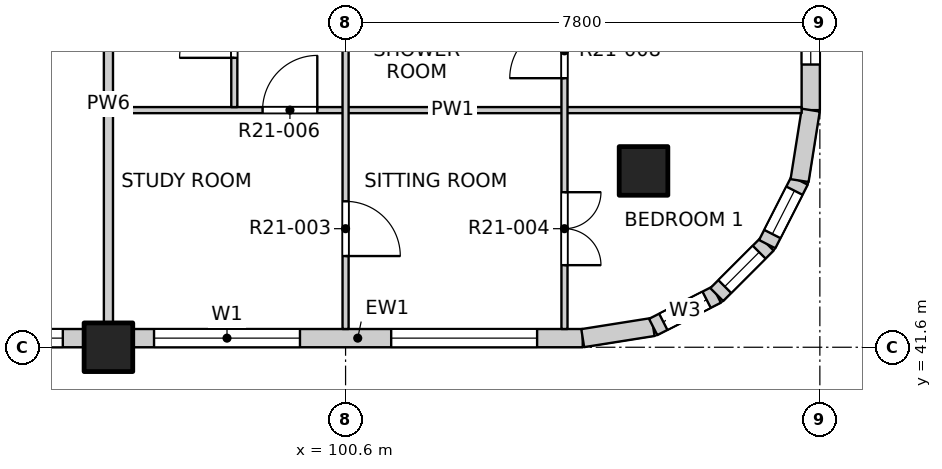
"""IFC4 building model, lengths in metres.
Left out: names, types, materials, properties, quantities, classifications, styles, units other than length and angle.
Written with IfcOpenShell. Run it as: python <this file> out.ifc"""

import sys

from ifc_helpers import new_model, si_unit, direction, frame, frame_2d, origin, origin_2d, place, context, subcontext, project, spatial, rectangle, extrude, element, fill, save


model = new_model("IFC4")
c1 = context("Model", 3, precision=1e-05, world=origin(), true_north=direction((0.0, 1.0)))
c2 = subcontext(c1, "Body", "Model", "MODEL_VIEW")
j1 = project(units=[si_unit("LENGTHUNIT", "METRE"), si_unit("PLANEANGLEUNIT", "RADIAN")], contexts=[c1])
p1 = place(None, origin())
s1 = spatial("IfcSite", under=j1, at=p1, CompositionType="ELEMENT")
p2 = place(p1, origin())
s2 = spatial("IfcBuilding", under=s1, at=p2, CompositionType="ELEMENT")
p3 = place(p2, frame((0.0, 0.0, 214.3)))
s3 = spatial("IfcBuildingStorey", under=s2, at=p3, CompositionType="ELEMENT", Elevation=214.3)
for number, where, z_axis, x_axis in (
    (1, (105.5, 44.5, -0.25), (0.0, 0.0, 1.0), (1.0, 0.0, 0.0)),
    (2, (96.7, 41.6, -0.25), (0.0, 0.0, 1.0), (1.0, 0.0, 0.0)),
):
    element("IfcColumn", number, at=place(p3, frame(where, z_axis=z_axis, x_axis=x_axis)), inside=s3, PredefinedType="COLUMN", context=c2, shape_type="SweptSolid", body=[
        extrude(rectangle(XDim=0.8, YDim=0.8, at=origin_2d()), origin(), (0.0, 0.0, 1.0), 3.4),
    ])
p4 = place(p3, frame((89.3, 41.75, 0.0), z_axis=(0.0, 0.0, 1.0), x_axis=(1.0, 0.0, 0.0)))
e3 = element("IfcWall", 3, at=p4, inside=s3, PredefinedType="SOLIDWALL", context=c2, shape_type="SweptSolid", body=[
    extrude(rectangle(XDim=7.0, YDim=0.3, at=frame_2d((3.5, 0.0))), origin(), (0.0, 0.0, 1.0), 2.7),
])
p5 = place(p4, frame((0.35, 0.0, 0.9)))
e4 = element("IfcOpeningElement", 4, at=p5, cuts=e3, PredefinedType="OPENING", context=c2, shape_type="SweptSolid", body=[
    extrude(rectangle(XDim=2.4, YDim=1.8, at=frame_2d((1.2, 0.9))), frame((0.0, 0.16, 0.0), z_axis=(0.0, -1.0, 0.0), x_axis=(1.0, 0.0, 0.0)), (0.0, 0.0, 1.0), 0.32),
])
p6 = place(p4, frame((4.25, 0.0, 0.9)))
e5 = element("IfcOpeningElement", 5, at=p6, cuts=e3, PredefinedType="OPENING", context=c2, shape_type="SweptSolid", body=[
    extrude(rectangle(XDim=2.4, YDim=1.8, at=frame_2d((1.2, 0.9))), frame((0.0, 0.16, 0.0), z_axis=(0.0, -1.0, 0.0), x_axis=(1.0, 0.0, 0.0)), (0.0, 0.0, 1.0), 0.32),
])
p7 = place(p3, frame((97.1, 41.75, 0.0), z_axis=(0.0, 0.0, 1.0), x_axis=(1.0, 0.0, 0.0)))
e6 = element("IfcWall", 6, at=p7, inside=s3, PredefinedType="SOLIDWALL", context=c2, shape_type="SweptSolid", body=[
    extrude(rectangle(XDim=7.4, YDim=0.3, at=frame_2d((3.7, 0.0))), origin(), (0.0, 0.0, 1.0), 2.7),
])
p8 = place(p7, frame((0.35, 0.0, 0.9)))
e7 = element("IfcOpeningElement", 7, at=p8, cuts=e6, PredefinedType="OPENING", context=c2, shape_type="SweptSolid", body=[
    extrude(rectangle(XDim=2.4, YDim=1.8, at=frame_2d((1.2, 0.9))), frame((0.0, 0.16, 0.0), z_axis=(0.0, -1.0, 0.0), x_axis=(1.0, 0.0, 0.0)), (0.0, 0.0, 1.0), 0.32),
])
p9 = place(p7, frame((4.25, 0.0, 0.9)))
e8 = element("IfcOpeningElement", 8, at=p9, cuts=e6, PredefinedType="OPENING", context=c2, shape_type="SweptSolid", body=[
    extrude(rectangle(XDim=2.4, YDim=1.8, at=frame_2d((1.2, 0.9))), frame((0.0, 0.16, 0.0), z_axis=(0.0, -1.0, 0.0), x_axis=(1.0, 0.0, 0.0)), (0.0, 0.0, 1.0), 0.32),
])
p10 = place(p3, frame((108.25, 45.5, 0.0), z_axis=(0.0, 0.0, 1.0), x_axis=(0.0, 1.0, 0.0)))
e9 = element("IfcWall", 9, at=p10, inside=s3, PredefinedType="SOLIDWALL", context=c2, shape_type="SweptSolid", body=[
    extrude(rectangle(XDim=7.4, YDim=0.3, at=frame_2d((3.7, 0.0))), origin(), (0.0, 0.0, 1.0), 2.7),
])
p11 = place(p10, frame((0.75, 0.0, 0.9)))
e10 = element("IfcOpeningElement", 10, at=p11, cuts=e9, PredefinedType="OPENING", context=c2, shape_type="SweptSolid", body=[
    extrude(rectangle(XDim=2.4, YDim=1.8, at=frame_2d((1.2, 0.9))), frame((0.0, 0.16, 0.0), z_axis=(0.0, -1.0, 0.0), x_axis=(1.0, 0.0, 0.0)), (0.0, 0.0, 1.0), 0.32),
])
p12 = place(p10, frame((4.65, 0.0, 0.9)))
e11 = element("IfcOpeningElement", 11, at=p12, cuts=e9, PredefinedType="OPENING", context=c2, shape_type="SweptSolid", body=[
    extrude(rectangle(XDim=2.4, YDim=1.8, at=frame_2d((1.2, 0.9))), frame((0.0, 0.16, 0.0), z_axis=(0.0, -1.0, 0.0), x_axis=(1.0, 0.0, 0.0)), (0.0, 0.0, 1.0), 0.32),
])
p13 = place(p3, frame((104.5, 41.75, 0.0), z_axis=(0.0, 0.0, 1.0), x_axis=(0.987678452879, 0.156496880861, 0.0)))
e12 = element("IfcWall", 12, at=p13, inside=s3, PredefinedType="SOLIDWALL", context=c2, shape_type="SweptSolid", body=[
    extrude(rectangle(XDim=1.173, YDim=0.3, at=frame_2d((0.586, 0.0))), origin(), (0.0, 0.0, 1.0), 2.7),
])
p14 = place(p3, frame((105.659, 41.934, 0.0), z_axis=(0.0, 0.0, 1.0), x_axis=(0.890988677504, 0.454025524128, 0.0)))
e13 = element("IfcWall", 13, at=p14, inside=s3, PredefinedType="SOLIDWALL", context=c2, shape_type="SweptSolid", body=[
    extrude(rectangle(XDim=1.173, YDim=0.3, at=frame_2d((0.587, 0.0))), origin(), (0.0, 0.0, 1.0), 2.7),
])
p15 = place(p14, frame((0.187, 0.0, 0.9)))
e14 = element("IfcOpeningElement", 14, at=p15, cuts=e13, PredefinedType="OPENING", context=c2, shape_type="SweptSolid", body=[
    extrude(rectangle(XDim=0.8, YDim=1.2, at=frame_2d((0.4, 0.6))), frame((0.0, 0.16, 0.0), z_axis=(0.0, -1.0, 0.0), x_axis=(1.0, 0.0, 0.0)), (0.0, 0.0, 1.0), 0.32),
])
p16 = place(p3, frame((106.704, 42.466, 0.0), z_axis=(0.0, 0.0, 1.0), x_axis=(0.707106781187, 0.707106781187, 0.0)))
e15 = element("IfcWall", 15, at=p16, inside=s3, PredefinedType="SOLIDWALL", context=c2, shape_type="SweptSolid", body=[
    extrude(rectangle(XDim=1.173, YDim=0.3, at=frame_2d((0.586, 0.0))), origin(), (0.0, 0.0, 1.0), 2.7),
])
p17 = place(p16, frame((0.187, 0.0, 0.9)))
e16 = element("IfcOpeningElement", 16, at=p17, cuts=e15, PredefinedType="OPENING", context=c2, shape_type="SweptSolid", body=[
    extrude(rectangle(XDim=0.8, YDim=1.2, at=frame_2d((0.4, 0.6))), frame((0.0, 0.16, 0.0), z_axis=(0.0, -1.0, 0.0), x_axis=(1.0, 0.0, 0.0)), (0.0, 0.0, 1.0), 0.32),
])
p18 = place(p3, frame((107.534, 43.296, 0.0), z_axis=(0.0, 0.0, 1.0), x_axis=(0.454025524128, 0.890988677504, 0.0)))
e17 = element("IfcWall", 17, at=p18, inside=s3, PredefinedType="SOLIDWALL", context=c2, shape_type="SweptSolid", body=[
    extrude(rectangle(XDim=1.173, YDim=0.3, at=frame_2d((0.587, 0.0))), origin(), (0.0, 0.0, 1.0), 2.7),
])
p19 = place(p18, frame((0.187, 0.0, 0.9)))
e18 = element("IfcOpeningElement", 18, at=p19, cuts=e17, PredefinedType="OPENING", context=c2, shape_type="SweptSolid", body=[
    extrude(rectangle(XDim=0.8, YDim=1.2, at=frame_2d((0.4, 0.6))), frame((0.0, 0.16, 0.0), z_axis=(0.0, -1.0, 0.0), x_axis=(1.0, 0.0, 0.0)), (0.0, 0.0, 1.0), 0.32),
])
p20 = place(p3, frame((108.066, 44.341, 0.0), z_axis=(0.0, 0.0, 1.0), x_axis=(0.156496880861, 0.987678452879, 0.0)))
e19 = element("IfcWall", 19, at=p20, inside=s3, PredefinedType="SOLIDWALL", context=c2, shape_type="SweptSolid", body=[
    extrude(rectangle(XDim=1.173, YDim=0.3, at=frame_2d((0.586, 0.0))), origin(), (0.0, 0.0, 1.0), 2.7),
])
p21 = place(p3, frame((96.625, 45.5, 0.0), z_axis=(0.0, 0.0, 1.0), x_axis=(1.0, 0.0, 0.0)))
e20 = element("IfcWall", 20, at=p21, inside=s3, PredefinedType="PARTITIONING", context=c2, shape_type="SweptSolid", body=[
    extrude(rectangle(XDim=11.475, YDim=0.1, at=frame_2d((5.738, 0.0))), origin(), (0.0, 0.0, 1.0), 3.15),
])
p22 = place(p21, frame((2.61, 0.0, 0.0)))
e21 = element("IfcOpeningElement", 21, at=p22, cuts=e20, PredefinedType="OPENING", context=c2, shape_type="SweptSolid", body=[
    extrude(rectangle(XDim=0.9, YDim=2.1, at=frame_2d((0.45, 1.05))), frame((0.0, 0.06, 0.0), z_axis=(0.0, -1.0, 0.0), x_axis=(1.0, 0.0, 0.0)), (0.0, 0.0, 1.0), 0.12),
])
p23 = place(p3, frame((96.7, 41.9, 0.0), z_axis=(0.0, 0.0, 1.0), x_axis=(0.0, 1.0, 0.0)))
e22 = element("IfcWall", 22, at=p23, inside=s3, PredefinedType="PARTITIONING", context=c2, shape_type="SweptSolid", body=[
    extrude(rectangle(XDim=7.4, YDim=0.15, at=frame_2d((3.7, 0.0))), origin(), (0.0, 0.0, 1.0), 3.15),
])
p24 = place(p3, frame((98.77, 45.55, 0.0), z_axis=(0.0, 0.0, 1.0), x_axis=(0.0, 1.0, 0.0)))
e23 = element("IfcWall", 23, at=p24, inside=s3, PredefinedType="PARTITIONING", context=c2, shape_type="SweptSolid", body=[
    extrude(rectangle(XDim=8.35, YDim=0.1, at=frame_2d((4.175, 0.0))), origin(), (0.0, 0.0, 1.0), 3.15),
])
p25 = place(p24, frame((0.81, 0.0, 0.0)))
e24 = element("IfcOpeningElement", 24, at=p25, cuts=e23, PredefinedType="OPENING", context=c2, shape_type="SweptSolid", body=[
    extrude(rectangle(XDim=0.9, YDim=2.1, at=frame_2d((0.45, 1.05))), frame((0.0, 0.06, 0.0), z_axis=(0.0, -1.0, 0.0), x_axis=(1.0, 0.0, 0.0)), (0.0, 0.0, 1.0), 0.12),
])
p26 = place(p24, frame((3.21, 0.0, 0.0)))
e25 = element("IfcOpeningElement", 25, at=p26, cuts=e23, PredefinedType="OPENING", context=c2, shape_type="SweptSolid", body=[
    extrude(rectangle(XDim=0.8, YDim=2.1, at=frame_2d((0.4, 1.05))), frame((0.0, 0.06, 0.0), z_axis=(0.0, -1.0, 0.0), x_axis=(1.0, 0.0, 0.0)), (0.0, 0.0, 1.0), 0.12),
])
p27 = place(p24, frame((5.1, 0.0, 0.0)))
e26 = element("IfcOpeningElement", 26, at=p27, cuts=e23, PredefinedType="OPENING", context=c2, shape_type="SweptSolid", body=[
    extrude(rectangle(XDim=0.9, YDim=2.1, at=frame_2d((0.45, 1.05))), frame((0.0, 0.06, 0.0), z_axis=(0.0, -1.0, 0.0), x_axis=(1.0, 0.0, 0.0)), (0.0, 0.0, 1.0), 0.12),
])
p28 = place(p24, frame((6.975, 0.0, 0.0)))
e27 = element("IfcOpeningElement", 27, at=p28, cuts=e23, PredefinedType="OPENING", context=c2, shape_type="SweptSolid", body=[
    extrude(rectangle(XDim=0.9, YDim=2.1, at=frame_2d((0.45, 1.05))), frame((0.0, 0.06, 0.0), z_axis=(0.0, -1.0, 0.0), x_axis=(1.0, 0.0, 0.0)), (0.0, 0.0, 1.0), 0.12),
])
p29 = place(p3, frame((100.6, 41.9, 0.0), z_axis=(0.0, 0.0, 1.0), x_axis=(0.0, 1.0, 0.0)))
e28 = element("IfcWall", 28, at=p29, inside=s3, PredefinedType="PARTITIONING", context=c2, shape_type="SweptSolid", body=[
    extrude(rectangle(XDim=46.2, YDim=0.1, at=frame_2d((23.1, 0.0))), origin(), (0.0, 0.0, 1.0), 3.15),
])
p30 = place(p29, frame((1.2, 0.0, 0.0)))
e29 = element("IfcOpeningElement", 29, at=p30, cuts=e28, PredefinedType="OPENING", context=c2, shape_type="SweptSolid", body=[
    extrude(rectangle(XDim=0.9, YDim=2.1, at=frame_2d((0.45, 1.05))), frame((0.0, 0.06, 0.0), z_axis=(0.0, -1.0, 0.0), x_axis=(1.0, 0.0, 0.0)), (0.0, 0.0, 1.0), 0.12),
])
p31 = place(p29, frame((6.025, 0.0, 0.0)))
e30 = element("IfcOpeningElement", 30, at=p31, cuts=e28, PredefinedType="OPENING", context=c2, shape_type="SweptSolid", body=[
    extrude(rectangle(XDim=0.9, YDim=2.1, at=frame_2d((0.45, 1.05))), frame((0.0, 0.06, 0.0), z_axis=(0.0, -1.0, 0.0), x_axis=(1.0, 0.0, 0.0)), (0.0, 0.0, 1.0), 0.12),
])
p32 = place(p29, frame((9.0, 0.0, 0.0)))
e31 = element("IfcOpeningElement", 31, at=p32, cuts=e28, PredefinedType="OPENING", context=c2, shape_type="SweptSolid", body=[
    extrude(rectangle(XDim=0.9, YDim=2.1, at=frame_2d((0.45, 1.05))), frame((0.0, 0.06, 0.0), z_axis=(0.0, -1.0, 0.0), x_axis=(1.0, 0.0, 0.0)), (0.0, 0.0, 1.0), 0.12),
])
p33 = place(p29, frame((13.85, 0.0, 0.0)))
e32 = element("IfcOpeningElement", 32, at=p33, cuts=e28, PredefinedType="OPENING", context=c2, shape_type="SweptSolid", body=[
    extrude(rectangle(XDim=0.9, YDim=2.1, at=frame_2d((0.45, 1.05))), frame((0.0, 0.06, 0.0), z_axis=(0.0, -1.0, 0.0), x_axis=(1.0, 0.0, 0.0)), (0.0, 0.0, 1.0), 0.12),
])
p34 = place(p29, frame((16.8, 0.0, 0.0)))
e33 = element("IfcOpeningElement", 33, at=p34, cuts=e28, PredefinedType="OPENING", context=c2, shape_type="SweptSolid", body=[
    extrude(rectangle(XDim=0.9, YDim=2.1, at=frame_2d((0.45, 1.05))), frame((0.0, 0.06, 0.0), z_axis=(0.0, -1.0, 0.0), x_axis=(1.0, 0.0, 0.0)), (0.0, 0.0, 1.0), 0.12),
])
p35 = place(p29, frame((21.625, 0.0, 0.0)))
e34 = element("IfcOpeningElement", 34, at=p35, cuts=e28, PredefinedType="OPENING", context=c2, shape_type="SweptSolid", body=[
    extrude(rectangle(XDim=0.9, YDim=2.1, at=frame_2d((0.45, 1.05))), frame((0.0, 0.06, 0.0), z_axis=(0.0, -1.0, 0.0), x_axis=(1.0, 0.0, 0.0)), (0.0, 0.0, 1.0), 0.12),
])
p36 = place(p29, frame((24.6, 0.0, 0.0)))
e35 = element("IfcOpeningElement", 35, at=p36, cuts=e28, PredefinedType="OPENING", context=c2, shape_type="SweptSolid", body=[
    extrude(rectangle(XDim=0.9, YDim=2.1, at=frame_2d((0.45, 1.05))), frame((0.0, 0.06, 0.0), z_axis=(0.0, -1.0, 0.0), x_axis=(1.0, 0.0, 0.0)), (0.0, 0.0, 1.0), 0.12),
])
p37 = place(p29, frame((29.425, 0.0, 0.0)))
e36 = element("IfcOpeningElement", 36, at=p37, cuts=e28, PredefinedType="OPENING", context=c2, shape_type="SweptSolid", body=[
    extrude(rectangle(XDim=0.9, YDim=2.1, at=frame_2d((0.45, 1.05))), frame((0.0, 0.06, 0.0), z_axis=(0.0, -1.0, 0.0), x_axis=(1.0, 0.0, 0.0)), (0.0, 0.0, 1.0), 0.12),
])
p38 = place(p29, frame((33.375, 0.0, 0.0)))
e37 = element("IfcOpeningElement", 37, at=p38, cuts=e28, PredefinedType="OPENING", context=c2, shape_type="SweptSolid", body=[
    extrude(rectangle(XDim=0.9, YDim=2.1, at=frame_2d((0.45, 1.05))), frame((0.0, 0.06, 0.0), z_axis=(0.0, -1.0, 0.0), x_axis=(1.0, 0.0, 0.0)), (0.0, 0.0, 1.0), 0.12),
])
p39 = place(p29, frame((36.3, 0.0, 0.0)))
e38 = element("IfcOpeningElement", 38, at=p39, cuts=e28, PredefinedType="OPENING", context=c2, shape_type="SweptSolid", body=[
    extrude(rectangle(XDim=0.9, YDim=2.1, at=frame_2d((0.45, 1.05))), frame((0.0, 0.06, 0.0), z_axis=(0.0, -1.0, 0.0), x_axis=(1.0, 0.0, 0.0)), (0.0, 0.0, 1.0), 0.12),
])
p40 = place(p29, frame((41.175, 0.0, 0.0)))
e39 = element("IfcOpeningElement", 39, at=p40, cuts=e28, PredefinedType="OPENING", context=c2, shape_type="SweptSolid", body=[
    extrude(rectangle(XDim=0.9, YDim=2.1, at=frame_2d((0.45, 1.05))), frame((0.0, 0.06, 0.0), z_axis=(0.0, -1.0, 0.0), x_axis=(1.0, 0.0, 0.0)), (0.0, 0.0, 1.0), 0.12),
])
p41 = place(p29, frame((44.1, 0.0, 0.0)))
e40 = element("IfcOpeningElement", 40, at=p41, cuts=e28, PredefinedType="OPENING", context=c2, shape_type="SweptSolid", body=[
    extrude(rectangle(XDim=0.9, YDim=2.1, at=frame_2d((0.45, 1.05))), frame((0.0, 0.06, 0.0), z_axis=(0.0, -1.0, 0.0), x_axis=(1.0, 0.0, 0.0)), (0.0, 0.0, 1.0), 0.12),
])
p42 = place(p3, frame((104.2, 41.9, 0.0), z_axis=(0.0, 0.0, 1.0), x_axis=(0.0, 1.0, 0.0)))
e41 = element("IfcWall", 41, at=p42, inside=s3, PredefinedType="PARTITIONING", context=c2, shape_type="SweptSolid", body=[
    extrude(rectangle(XDim=23.0, YDim=0.1, at=frame_2d((11.5, 0.0))), origin(), (0.0, 0.0, 1.0), 3.15),
])
p43 = place(p42, frame((1.05, 0.0, 0.0)))
e42 = element("IfcOpeningElement", 42, at=p43, cuts=e41, PredefinedType="OPENING", context=c2, shape_type="SweptSolid", body=[
    extrude(rectangle(XDim=1.2, YDim=2.1, at=frame_2d((0.6, 1.05))), frame((0.0, 0.06, 0.0), z_axis=(0.0, -1.0, 0.0), x_axis=(1.0, 0.0, 0.0)), (0.0, 0.0, 1.0), 0.12),
])
p44 = place(p42, frame((4.125, 0.0, 0.0)))
e43 = element("IfcOpeningElement", 43, at=p44, cuts=e41, PredefinedType="OPENING", context=c2, shape_type="SweptSolid", body=[
    extrude(rectangle(XDim=0.9, YDim=2.1, at=frame_2d((0.45, 1.05))), frame((0.0, 0.06, 0.0), z_axis=(0.0, -1.0, 0.0), x_axis=(1.0, 0.0, 0.0)), (0.0, 0.0, 1.0), 0.12),
])
p45 = place(p42, frame((6.075, 0.0, 0.0)))
e44 = element("IfcOpeningElement", 44, at=p45, cuts=e41, PredefinedType="OPENING", context=c2, shape_type="SweptSolid", body=[
    extrude(rectangle(XDim=0.9, YDim=2.1, at=frame_2d((0.45, 1.05))), frame((0.0, 0.06, 0.0), z_axis=(0.0, -1.0, 0.0), x_axis=(1.0, 0.0, 0.0)), (0.0, 0.0, 1.0), 0.12),
])
p46 = place(p42, frame((8.85, 0.0, 0.0)))
e45 = element("IfcOpeningElement", 45, at=p46, cuts=e41, PredefinedType="OPENING", context=c2, shape_type="SweptSolid", body=[
    extrude(rectangle(XDim=1.2, YDim=2.1, at=frame_2d((0.6, 1.05))), frame((0.0, 0.06, 0.0), z_axis=(0.0, -1.0, 0.0), x_axis=(1.0, 0.0, 0.0)), (0.0, 0.0, 1.0), 0.12),
])
p47 = place(p42, frame((11.925, 0.0, 0.0)))
e46 = element("IfcOpeningElement", 46, at=p47, cuts=e41, PredefinedType="OPENING", context=c2, shape_type="SweptSolid", body=[
    extrude(rectangle(XDim=0.9, YDim=2.1, at=frame_2d((0.45, 1.05))), frame((0.0, 0.06, 0.0), z_axis=(0.0, -1.0, 0.0), x_axis=(1.0, 0.0, 0.0)), (0.0, 0.0, 1.0), 0.12),
])
p48 = place(p42, frame((13.875, 0.0, 0.0)))
e47 = element("IfcOpeningElement", 47, at=p48, cuts=e41, PredefinedType="OPENING", context=c2, shape_type="SweptSolid", body=[
    extrude(rectangle(XDim=0.9, YDim=2.1, at=frame_2d((0.45, 1.05))), frame((0.0, 0.06, 0.0), z_axis=(0.0, -1.0, 0.0), x_axis=(1.0, 0.0, 0.0)), (0.0, 0.0, 1.0), 0.12),
])
p49 = place(p42, frame((16.65, 0.0, 0.0)))
e48 = element("IfcOpeningElement", 48, at=p49, cuts=e41, PredefinedType="OPENING", context=c2, shape_type="SweptSolid", body=[
    extrude(rectangle(XDim=1.2, YDim=2.1, at=frame_2d((0.6, 1.05))), frame((0.0, 0.06, 0.0), z_axis=(0.0, -1.0, 0.0), x_axis=(1.0, 0.0, 0.0)), (0.0, 0.0, 1.0), 0.12),
])
p50 = place(p42, frame((19.725, 0.0, 0.0)))
e49 = element("IfcOpeningElement", 49, at=p50, cuts=e41, PredefinedType="OPENING", context=c2, shape_type="SweptSolid", body=[
    extrude(rectangle(XDim=0.9, YDim=2.1, at=frame_2d((0.45, 1.05))), frame((0.0, 0.06, 0.0), z_axis=(0.0, -1.0, 0.0), x_axis=(1.0, 0.0, 0.0)), (0.0, 0.0, 1.0), 0.12),
])
p51 = place(p42, frame((21.675, 0.0, 0.0)))
e50 = element("IfcOpeningElement", 50, at=p51, cuts=e41, PredefinedType="OPENING", context=c2, shape_type="SweptSolid", body=[
    extrude(rectangle(XDim=0.9, YDim=2.1, at=frame_2d((0.45, 1.05))), frame((0.0, 0.06, 0.0), z_axis=(0.0, -1.0, 0.0), x_axis=(1.0, 0.0, 0.0)), (0.0, 0.0, 1.0), 0.12),
])
p52 = place(p6, origin())
e51 = element("IfcWindow", 51, at=p52, inside=s3, PartitioningType="DOUBLE_PANEL_VERTICAL", PredefinedType="WINDOW", context=c2, shape_type="SweptSolid", body=[
    extrude(rectangle(XDim=2.4, YDim=1.8, at=frame_2d((1.2, 0.9))), frame((0.0, 0.03, 0.0), z_axis=(0.0, -1.0, 0.0), x_axis=(1.0, 0.0, 0.0)), (0.0, 0.0, 1.0), 0.06),
])
fill(e5, e51)
p53 = place(p8, origin())
e52 = element("IfcWindow", 52, at=p53, inside=s3, PartitioningType="DOUBLE_PANEL_VERTICAL", PredefinedType="WINDOW", context=c2, shape_type="SweptSolid", body=[
    extrude(rectangle(XDim=2.4, YDim=1.8, at=frame_2d((1.2, 0.9))), frame((0.0, 0.03, 0.0), z_axis=(0.0, -1.0, 0.0), x_axis=(1.0, 0.0, 0.0)), (0.0, 0.0, 1.0), 0.06),
])
fill(e7, e52)
p54 = place(p9, origin())
e53 = element("IfcWindow", 53, at=p54, inside=s3, PartitioningType="DOUBLE_PANEL_VERTICAL", PredefinedType="WINDOW", context=c2, shape_type="SweptSolid", body=[
    extrude(rectangle(XDim=2.4, YDim=1.8, at=frame_2d((1.2, 0.9))), frame((0.0, 0.03, 0.0), z_axis=(0.0, -1.0, 0.0), x_axis=(1.0, 0.0, 0.0)), (0.0, 0.0, 1.0), 0.06),
])
fill(e8, e53)
p55 = place(p11, origin())
e54 = element("IfcWindow", 54, at=p55, inside=s3, PartitioningType="DOUBLE_PANEL_VERTICAL", PredefinedType="WINDOW", context=c2, shape_type="SweptSolid", body=[
    extrude(rectangle(XDim=2.4, YDim=1.8, at=frame_2d((1.2, 0.9))), frame((0.0, 0.03, 0.0), z_axis=(0.0, -1.0, 0.0), x_axis=(1.0, 0.0, 0.0)), (0.0, 0.0, 1.0), 0.06),
])
fill(e10, e54)
p56 = place(p15, origin())
e55 = element("IfcWindow", 55, at=p56, inside=s3, PartitioningType="SINGLE_PANEL", PredefinedType="WINDOW", context=c2, shape_type="SweptSolid", body=[
    extrude(rectangle(XDim=0.8, YDim=1.2, at=frame_2d((0.4, 0.6))), frame((0.0, 0.03, 0.0), z_axis=(0.0, -1.0, 0.0), x_axis=(1.0, 0.0, 0.0)), (0.0, 0.0, 1.0), 0.06),
])
fill(e14, e55)
p57 = place(p17, origin())
e56 = element("IfcWindow", 56, at=p57, inside=s3, PartitioningType="SINGLE_PANEL", PredefinedType="WINDOW", context=c2, shape_type="SweptSolid", body=[
    extrude(rectangle(XDim=0.8, YDim=1.2, at=frame_2d((0.4, 0.6))), frame((0.0, 0.03, 0.0), z_axis=(0.0, -1.0, 0.0), x_axis=(1.0, 0.0, 0.0)), (0.0, 0.0, 1.0), 0.06),
])
fill(e16, e56)
p58 = place(p19, origin())
e57 = element("IfcWindow", 57, at=p58, inside=s3, PartitioningType="SINGLE_PANEL", PredefinedType="WINDOW", context=c2, shape_type="SweptSolid", body=[
    extrude(rectangle(XDim=0.8, YDim=1.2, at=frame_2d((0.4, 0.6))), frame((0.0, 0.03, 0.0), z_axis=(0.0, -1.0, 0.0), x_axis=(1.0, 0.0, 0.0)), (0.0, 0.0, 1.0), 0.06),
])
fill(e18, e57)
p59 = place(p30, origin())
e58 = element("IfcDoor", 58, at=p59, inside=s3, OperationType="SINGLE_SWING_RIGHT", PredefinedType="DOOR", context=c2, shape_type="SweptSolid", body=[
    extrude(rectangle(XDim=0.9, YDim=2.1, at=frame_2d((0.45, 1.05))), frame((0.0, 0.025, 0.0), z_axis=(0.0, -1.0, 0.0), x_axis=(1.0, 0.0, 0.0)), (0.0, 0.0, 1.0), 0.05),
])
fill(e29, e58)
p60 = place(p43, origin())
e59 = element("IfcDoor", 59, at=p60, inside=s3, OperationType="DOUBLE_DOOR_SINGLE_SWING", PredefinedType="DOOR", context=c2, shape_type="SweptSolid", body=[
    extrude(rectangle(XDim=1.2, YDim=2.1, at=frame_2d((0.6, 1.05))), frame((0.0, 0.025, 0.0), z_axis=(0.0, -1.0, 0.0), x_axis=(1.0, 0.0, 0.0)), (0.0, 0.0, 1.0), 0.05),
])
fill(e42, e59)
p61 = place(p22, origin())
e60 = element("IfcDoor", 60, at=p61, inside=s3, OperationType="SINGLE_SWING_RIGHT", PredefinedType="DOOR", context=c2, shape_type="SweptSolid", body=[
    extrude(rectangle(XDim=0.9, YDim=2.1, at=frame_2d((0.45, 1.05))), frame((0.0, 0.025, 0.0), z_axis=(0.0, -1.0, 0.0), x_axis=(1.0, 0.0, 0.0)), (0.0, 0.0, 1.0), 0.05),
])
fill(e21, e60)
p62 = place(p44, origin())
e61 = element("IfcDoor", 61, at=p62, inside=s3, OperationType="SINGLE_SWING_LEFT", PredefinedType="DOOR", context=c2, shape_type="SweptSolid", body=[
    extrude(rectangle(XDim=0.9, YDim=2.1, at=frame_2d((0.45, 1.05))), frame((0.0, 0.025, 0.0), z_axis=(0.0, -1.0, 0.0), x_axis=(1.0, 0.0, 0.0)), (0.0, 0.0, 1.0), 0.05),
])
fill(e43, e61)
p63 = place(p25, origin())
e62 = element("IfcDoor", 62, at=p63, inside=s3, OperationType="SINGLE_SWING_LEFT", PredefinedType="DOOR", context=c2, shape_type="SweptSolid", body=[
    extrude(rectangle(XDim=0.9, YDim=2.1, at=frame_2d((0.45, 1.05))), frame((0.0, 0.025, 0.0), z_axis=(0.0, -1.0, 0.0), x_axis=(1.0, 0.0, 0.0)), (0.0, 0.0, 1.0), 0.05),
])
fill(e24, e62)
save(model, sys.argv[1])
